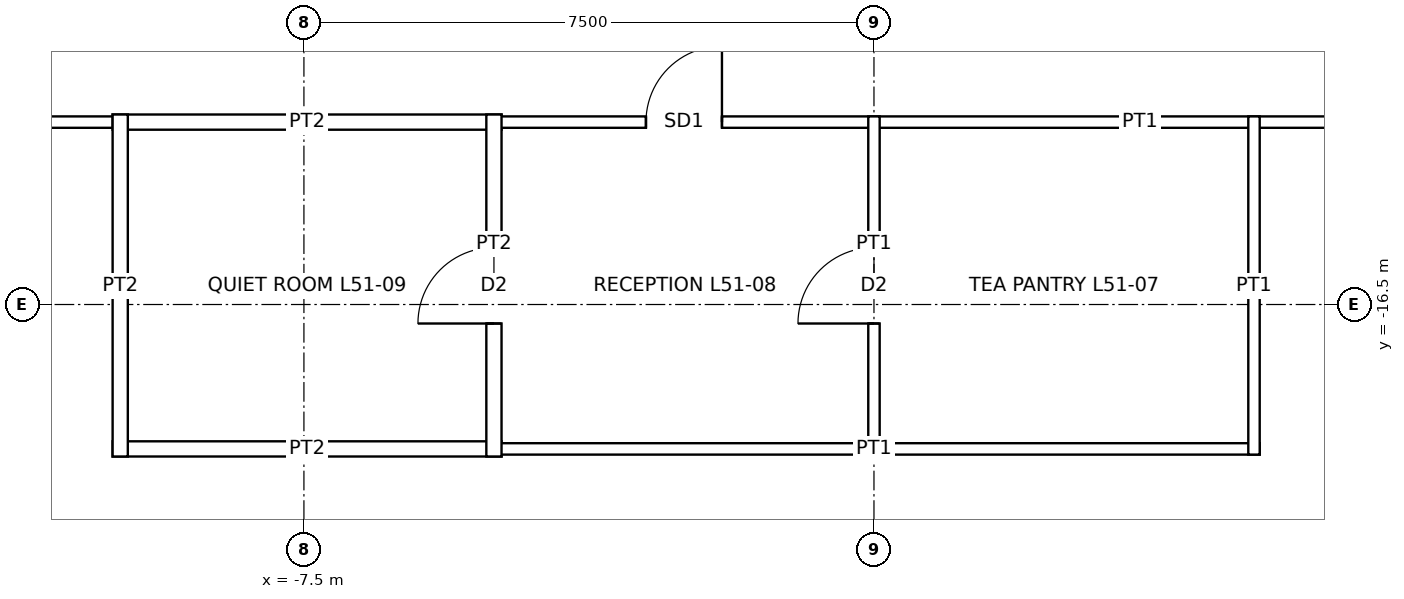
"""IFC4 building model, lengths in metres.
Left out: names, types, materials, properties, quantities, classifications, styles, units other than length and angle.
Written with IfcOpenShell. Run it as: python <this file> out.ifc"""

import sys

from ifc_helpers import new_model, si_unit, direction, frame, frame_2d, origin, place, context, subcontext, project, spatial, rectangle, extrude, element, fill, save


model = new_model("IFC4")
c1 = context("Model", 3, precision=1e-05, world=origin(), true_north=direction((0.0, 1.0)))
c2 = subcontext(c1, "Body", "Model", "MODEL_VIEW")
j1 = project(units=[si_unit("LENGTHUNIT", "METRE"), si_unit("PLANEANGLEUNIT", "RADIAN")], contexts=[c1])
p1 = place(None, origin())
s1 = spatial("IfcSite", under=j1, at=p1, CompositionType="ELEMENT")
p2 = place(p1, origin())
s2 = spatial("IfcBuilding", under=s1, at=p2, CompositionType="ELEMENT")
p3 = place(p2, frame((0.0, 0.0, 237.9)))
s3 = spatial("IfcBuildingStorey", under=s2, at=p3, CompositionType="ELEMENT", Elevation=237.9)
p4 = place(p3, frame((-10.017, -18.4, 0.0), z_axis=(0.0, 0.0, 1.0), x_axis=(1.0, 0.0, 0.0)))
e1 = element("IfcWall", 1, at=p4, inside=s3, PredefinedType="PARTITIONING", context=c2, shape_type="SweptSolid", body=[
    extrude(rectangle(XDim=5.117, YDim=0.2, at=frame_2d((2.559, 0.0))), origin(), (0.0, 0.0, 1.0), 3.85),
])
p5 = place(p3, frame((-5.075, -18.4, 0.0), z_axis=(0.0, 0.0, 1.0), x_axis=(1.0, 0.0, 0.0)))
e2 = element("IfcWall", 2, at=p5, inside=s3, PredefinedType="PARTITIONING", context=c2, shape_type="SweptSolid", body=[
    extrude(rectangle(XDim=10.15, YDim=0.15, at=frame_2d((5.075, 0.0))), origin(), (0.0, 0.0, 1.0), 3.85),
])
p6 = place(p3, frame((-14.175, -14.1, 0.0), z_axis=(0.0, 0.0, 1.0), x_axis=(1.0, 0.0, 0.0)))
e3 = element("IfcWall", 3, at=p6, inside=s3, PredefinedType="PARTITIONING", context=c2, shape_type="SweptSolid", body=[
    extrude(rectangle(XDim=4.333, YDim=0.15, at=frame_2d((2.167, 0.0))), origin(), (0.0, 0.0, 1.0), 3.85),
])
p7 = place(p3, frame((-10.017, -14.1, 0.0), z_axis=(0.0, 0.0, 1.0), x_axis=(1.0, 0.0, 0.0)))
e4 = element("IfcWall", 4, at=p7, inside=s3, PredefinedType="PARTITIONING", context=c2, shape_type="SweptSolid", body=[
    extrude(rectangle(XDim=5.117, YDim=0.2, at=frame_2d((2.559, 0.0))), origin(), (0.0, 0.0, 1.0), 3.85),
])
p8 = place(p3, frame((-5.075, -14.1, 0.0), z_axis=(0.0, 0.0, 1.0), x_axis=(1.0, 0.0, 0.0)))
e5 = element("IfcWall", 5, at=p8, inside=s3, PredefinedType="PARTITIONING", context=c2, shape_type="SweptSolid", body=[
    extrude(rectangle(XDim=17.15, YDim=0.15, at=frame_2d((8.575, 0.0))), origin(), (0.0, 0.0, 1.0), 3.85),
])
p9 = place(p8, frame((2.075, 0.0, 0.0)))
e6 = element("IfcOpeningElement", 6, at=p9, cuts=e5, PredefinedType="OPENING", context=c2, shape_type="SweptSolid", body=[
    extrude(rectangle(XDim=1.0, YDim=2.4, at=frame_2d((0.5, 1.2))), frame((0.0, 0.085, 0.0), z_axis=(0.0, -1.0, 0.0), x_axis=(1.0, 0.0, 0.0)), (0.0, 0.0, 1.0), 0.17),
])
p10 = place(p3, frame((-9.917, -18.5, 0.0), z_axis=(0.0, 0.0, 1.0), x_axis=(0.0, 1.0, 0.0)))
e7 = element("IfcWall", 7, at=p10, inside=s3, PredefinedType="PARTITIONING", context=c2, shape_type="SweptSolid", body=[
    extrude(rectangle(XDim=4.5, YDim=0.2, at=frame_2d((2.25, 0.0))), origin(), (0.0, 0.0, 1.0), 3.85),
])
p11 = place(p3, frame((-5.0, -18.5, 0.0), z_axis=(0.0, 0.0, 1.0), x_axis=(0.0, 1.0, 0.0)))
e8 = element("IfcWall", 8, at=p11, inside=s3, PredefinedType="PARTITIONING", context=c2, shape_type="SweptSolid", body=[
    extrude(rectangle(XDim=4.5, YDim=0.2, at=frame_2d((2.25, 0.0))), origin(), (0.0, 0.0, 1.0), 3.85),
])
p12 = place(p11, frame((1.75, 0.0, 0.0)))
e9 = element("IfcOpeningElement", 9, at=p12, cuts=e8, PredefinedType="OPENING", context=c2, shape_type="SweptSolid", body=[
    extrude(rectangle(XDim=1.0, YDim=2.1, at=frame_2d((0.5, 1.05))), frame((0.0, 0.11, 0.0), z_axis=(0.0, -1.0, 0.0), x_axis=(1.0, 0.0, 0.0)), (0.0, 0.0, 1.0), 0.22),
])
p13 = place(p3, frame((0.0, -18.475, 0.0), z_axis=(0.0, 0.0, 1.0), x_axis=(0.0, 1.0, 0.0)))
e10 = element("IfcWall", 10, at=p13, inside=s3, PredefinedType="PARTITIONING", context=c2, shape_type="SweptSolid", body=[
    extrude(rectangle(XDim=4.45, YDim=0.15, at=frame_2d((2.225, 0.0))), origin(), (0.0, 0.0, 1.0), 3.238),
])
p14 = place(p13, frame((1.725, 0.0, 0.0)))
e11 = element("IfcOpeningElement", 11, at=p14, cuts=e10, PredefinedType="OPENING", context=c2, shape_type="SweptSolid", body=[
    extrude(rectangle(XDim=1.0, YDim=2.1, at=frame_2d((0.5, 1.05))), frame((0.0, 0.085, 0.0), z_axis=(0.0, -1.0, 0.0), x_axis=(1.0, 0.0, 0.0)), (0.0, 0.0, 1.0), 0.17),
])
p15 = place(p3, frame((5.0, -18.475, 0.0), z_axis=(0.0, 0.0, 1.0), x_axis=(0.0, 1.0, 0.0)))
e12 = element("IfcWall", 12, at=p15, inside=s3, PredefinedType="PARTITIONING", context=c2, shape_type="SweptSolid", body=[
    extrude(rectangle(XDim=4.45, YDim=0.15, at=frame_2d((2.225, 0.0))), origin(), (0.0, 0.0, 1.0), 3.85),
])
p16 = place(p14, origin())
e13 = element("IfcDoor", 13, at=p16, inside=s3, OperationType="SINGLE_SWING_LEFT", PredefinedType="DOOR", context=c2, shape_type="SweptSolid", body=[
    extrude(rectangle(XDim=1.0, YDim=2.1, at=frame_2d((0.5, 1.05))), frame((0.0, 0.025, 0.0), z_axis=(0.0, -1.0, 0.0), x_axis=(1.0, 0.0, 0.0)), (0.0, 0.0, 1.0), 0.05),
])
fill(e11, e13)
p17 = place(p9, origin())
e14 = element("IfcDoor", 14, at=p17, inside=s3, OperationType="SINGLE_SWING_RIGHT", PredefinedType="DOOR", context=c2, shape_type="SweptSolid", body=[
    extrude(rectangle(XDim=1.0, YDim=2.4, at=frame_2d((0.5, 1.2))), frame((0.0, 0.025, 0.0), z_axis=(0.0, -1.0, 0.0), x_axis=(1.0, 0.0, 0.0)), (0.0, 0.0, 1.0), 0.05),
])
fill(e6, e14)
p18 = place(p12, origin())
e15 = element("IfcDoor", 15, at=p18, inside=s3, OperationType="SINGLE_SWING_LEFT", PredefinedType="DOOR", context=c2, shape_type="SweptSolid", body=[
    extrude(rectangle(XDim=1.0, YDim=2.1, at=frame_2d((0.5, 1.05))), frame((0.0, 0.025, 0.0), z_axis=(0.0, -1.0, 0.0), x_axis=(1.0, 0.0, 0.0)), (0.0, 0.0, 1.0), 0.05),
])
fill(e9, e15)
save(model, sys.argv[1])
